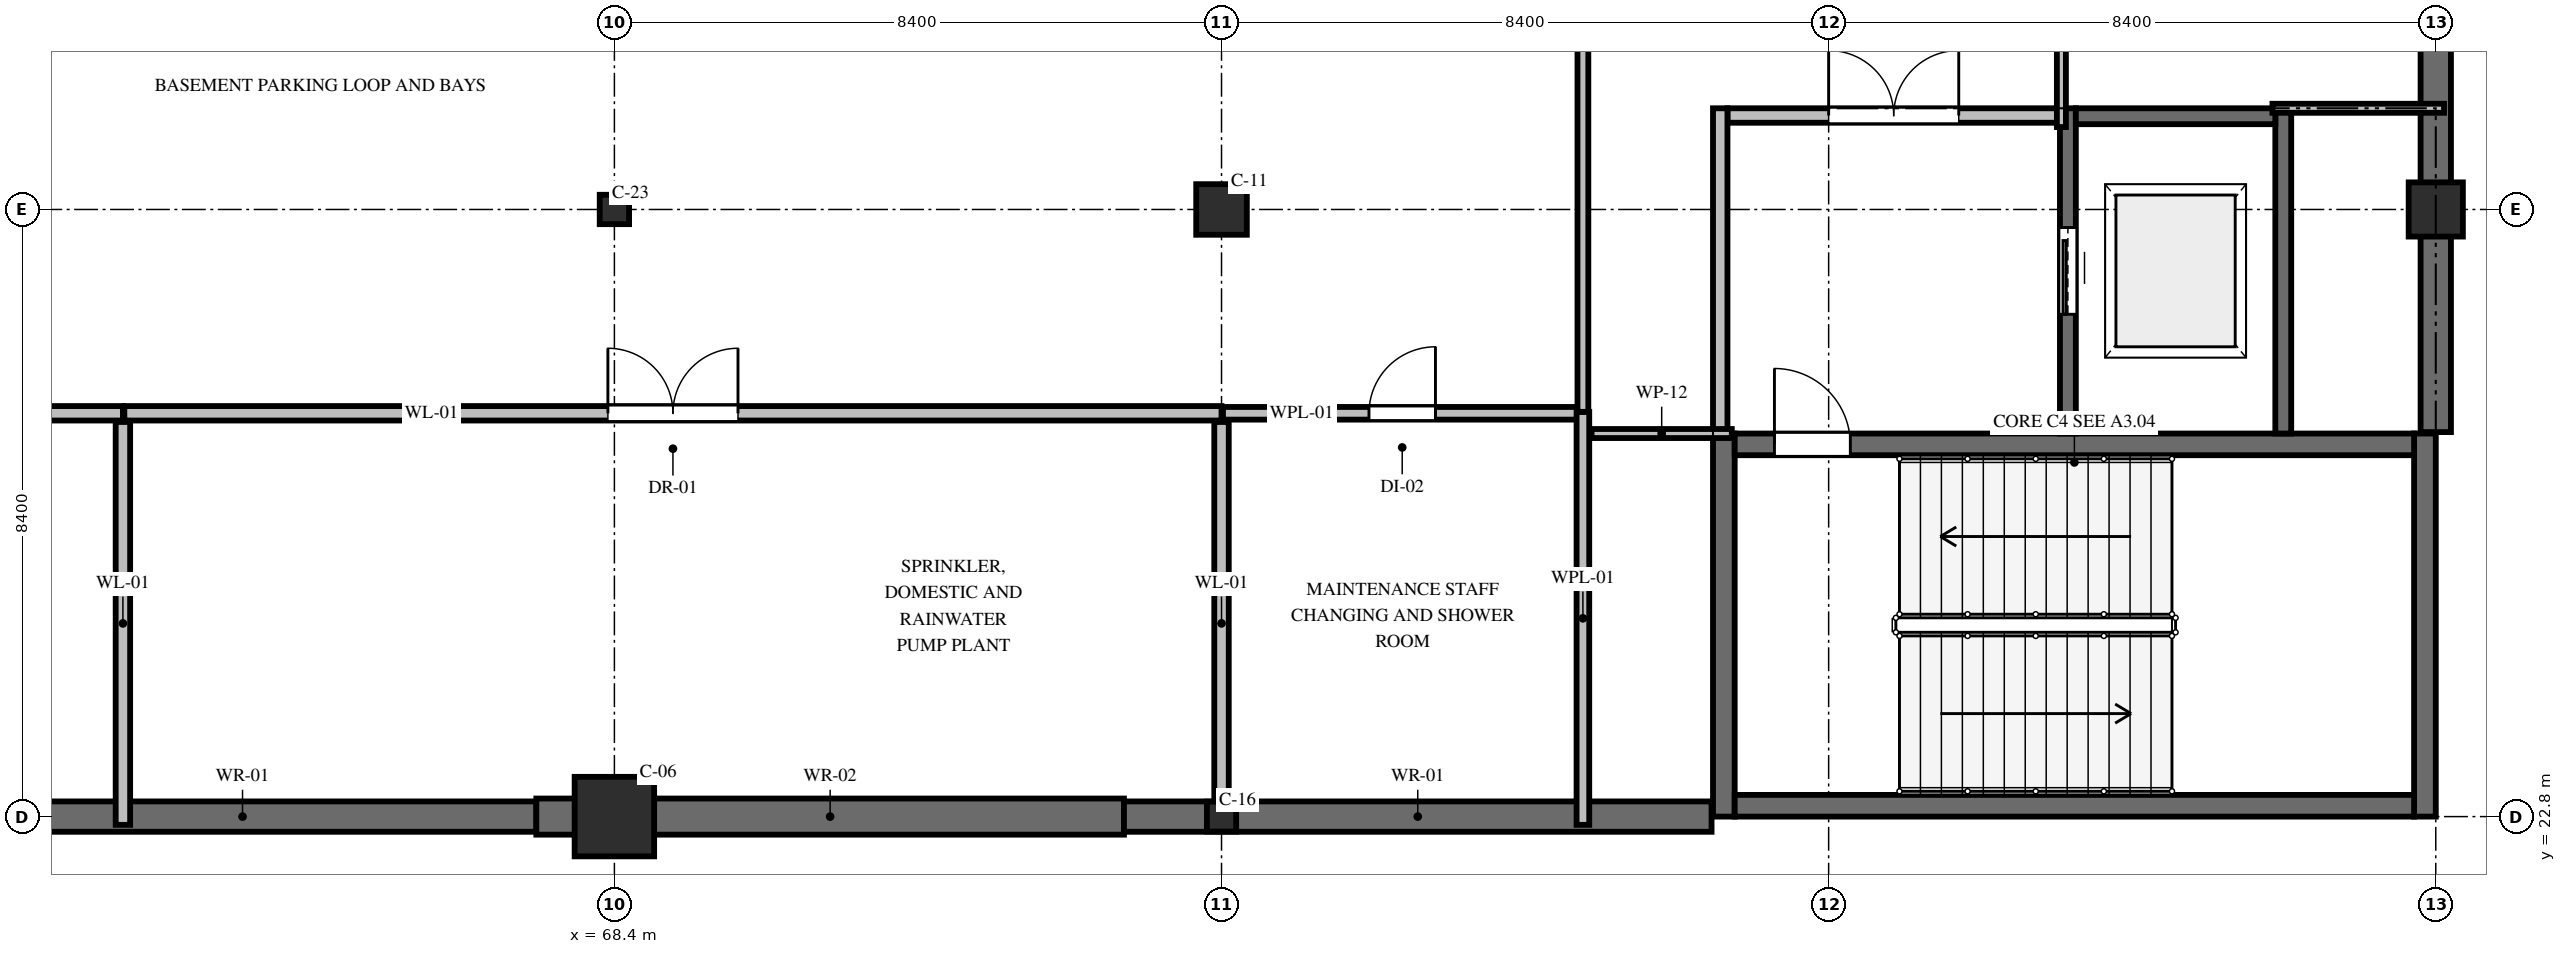
"""IFC4 building model, lengths in metres.
Left out: names, types, materials, properties, quantities, classifications, styles, units other than length and angle.
Written with IfcOpenShell. Run it as: python <this file> out.ifc"""

import sys

from ifc_helpers import new_model, si_unit, direction, frame, frame_2d, origin, origin_2d, place, context, subcontext, project, spatial, rectangle, circle, hollow_circle, i_section, extrude, element, fill, save


model = new_model("IFC4")
c1 = context("Model", 3, precision=1e-05, world=origin(), true_north=direction((0.0, 1.0)))
c2 = subcontext(c1, "Body", "Model", "MODEL_VIEW")
j1 = project(units=[si_unit("LENGTHUNIT", "METRE"), si_unit("PLANEANGLEUNIT", "RADIAN")], contexts=[c1])
p1 = place(None, origin())
s1 = spatial("IfcSite", under=j1, at=p1, CompositionType="ELEMENT")
p2 = place(p1, origin())
s2 = spatial("IfcBuilding", under=s1, at=p2, CompositionType="ELEMENT")
p3 = place(p2, frame((0.0, 0.0, -4.8)))
s3 = spatial("IfcBuildingStorey", under=s2, at=p3, CompositionType="ELEMENT", Elevation=-4.8)
p4 = place(p3, frame((68.4, 22.8, 0.0), z_axis=(0.0, 0.0, 1.0), x_axis=(1.0, 0.0, 0.0)))
e1 = element("IfcColumn", 1, at=p4, inside=s3, PredefinedType="COLUMN", context=c2, shape_type="SweptSolid", body=[
    extrude(rectangle(XDim=1.1, YDim=1.1, at=origin_2d()), origin(), (0.0, 0.0, 1.0), 4.8),
])
p5 = place(p3, frame((68.4, 31.2, 0.0), z_axis=(0.0, 0.0, 1.0), x_axis=(1.0, 0.0, 0.0)))
e2 = element("IfcColumn", 2, at=p5, inside=s3, PredefinedType="COLUMN", context=c2, shape_type="SweptSolid", body=[
    extrude(hollow_circle(Radius=0.203, WallThickness=0.016, at=origin_2d()), origin(), (0.0, 0.0, 1.0), 4.8),
])
p6 = place(p3, frame((76.8, 22.8, 0.0), z_axis=(0.0, 0.0, 1.0), x_axis=(1.0, 0.0, 0.0)))
e3 = element("IfcColumn", 3, at=p6, inside=s3, PredefinedType="COLUMN", context=c2, shape_type="SweptSolid", body=[
    extrude(i_section(OverallWidth=0.405, OverallDepth=0.414, WebThickness=0.018, FlangeThickness=0.028, FilletRadius=0.022, at=origin_2d()), origin(), (0.0, 0.0, 1.0), 4.8),
])
p7 = place(p3, frame((76.8, 31.2, 0.0), z_axis=(0.0, 0.0, 1.0), x_axis=(1.0, 0.0, 0.0)))
e4 = element("IfcColumn", 4, at=p7, inside=s3, PredefinedType="COLUMN", context=c2, shape_type="SweptSolid", body=[
    extrude(circle(Radius=0.35, at=origin_2d()), origin(), (0.0, 0.0, 1.0), 4.8),
])
p8 = place(p3, frame((93.6, 31.2, 0.0), z_axis=(0.0, 0.0, 1.0), x_axis=(1.0, 0.0, 0.0)))
e5 = element("IfcColumn", 5, at=p8, inside=s3, PredefinedType="COLUMN", context=c2, shape_type="SweptSolid", body=[
    extrude(rectangle(XDim=0.75, YDim=0.75, at=origin_2d()), origin(), (0.0, 0.0, 1.0), 4.8),
])
p9 = place(p3, frame((59.19, 22.8, 0.0), z_axis=(0.0, 0.0, 1.0), x_axis=(1.0, 0.0, 0.0)))
e6 = element("IfcWall", 6, at=p9, inside=s3, PredefinedType="USERDEFINED", context=c2, shape_type="SweptSolid", body=[
    extrude(rectangle(XDim=8.13, YDim=0.42, at=frame_2d((4.065, 0.0))), origin(), (0.0, 0.0, 1.0), 4.32),
])
p10 = place(p3, frame((67.32, 22.8, 0.0), z_axis=(0.0, 0.0, 1.0), x_axis=(1.0, 0.0, 0.0)))
e7 = element("IfcWall", 7, at=p10, inside=s3, PredefinedType="USERDEFINED", context=c2, shape_type="SweptSolid", body=[
    extrude(rectangle(XDim=8.13, YDim=0.5, at=frame_2d((4.065, 0.0))), origin(), (0.0, 0.0, 1.0), 4.32),
])
p11 = place(p3, frame((75.45, 22.8, 0.0), z_axis=(0.0, 0.0, 1.0), x_axis=(1.0, 0.0, 0.0)))
e8 = element("IfcWall", 8, at=p11, inside=s3, PredefinedType="USERDEFINED", context=c2, shape_type="SweptSolid", body=[
    extrude(rectangle(XDim=8.13, YDim=0.42, at=frame_2d((4.065, 0.0))), origin(), (0.0, 0.0, 1.0), 4.32),
])
p12 = place(p3, frame((93.6, 28.12, 0.0), z_axis=(0.0, 0.0, 1.0), x_axis=(0.0, 1.0, 0.0)))
e9 = element("IfcWall", 9, at=p12, inside=s3, PredefinedType="USERDEFINED", context=c2, shape_type="SweptSolid", body=[
    extrude(rectangle(XDim=8.309, YDim=0.42, at=frame_2d((4.154, 0.0))), origin(), (0.0, 0.0, 1.0), 4.32),
])
for number, where, z_axis, x_axis in (
    (10, (83.75, 22.8, 0.0), (0.0, 0.0, 1.0), (0.0, 1.0, 0.0)),
    (11, (93.45, 28.1, 0.0), (0.0, 0.0, 1.0), (0.0, -1.0, 0.0)),
):
    element("IfcWall", number, at=place(p3, frame(where, z_axis=z_axis, x_axis=x_axis)), inside=s3, PredefinedType="SHEAR", context=c2, shape_type="SweptSolid", body=[
        extrude(rectangle(XDim=5.3, YDim=0.3, at=frame_2d((2.65, 0.0))), origin(), (0.0, 0.0, 1.0), 4.51),
    ])
p13 = place(p3, frame((93.3, 22.95, 0.0), z_axis=(0.0, 0.0, 1.0), x_axis=(-1.0, 0.0, 0.0)))
e12 = element("IfcWall", 12, at=p13, inside=s3, PredefinedType="SHEAR", context=c2, shape_type="SweptSolid", body=[
    extrude(rectangle(XDim=9.4, YDim=0.3, at=frame_2d((4.7, 0.0))), origin(), (0.0, 0.0, 1.0), 4.51),
])
p14 = place(p3, frame((83.9, 27.95, 0.0), z_axis=(0.0, 0.0, 1.0), x_axis=(1.0, 0.0, 0.0)))
e13 = element("IfcWall", 13, at=p14, inside=s3, PredefinedType="SHEAR", context=c2, shape_type="SweptSolid", body=[
    extrude(rectangle(XDim=9.4, YDim=0.3, at=frame_2d((4.7, 0.0))), origin(), (0.0, 0.0, 1.0), 4.51),
])
p15 = place(p14, frame((0.55, 0.0, 0.0)))
e14 = element("IfcOpeningElement", 14, at=p15, cuts=e13, PredefinedType="OPENING", context=c2, shape_type="SweptSolid", body=[
    extrude(rectangle(XDim=1.05, YDim=2.2, at=frame_2d((0.525, 1.1))), frame((0.0, 0.16, 0.0), z_axis=(0.0, -1.0, 0.0), x_axis=(1.0, 0.0, 0.0)), (0.0, 0.0, 1.0), 0.32),
])
p16 = place(p3, frame((83.8, 32.5, 0.0), z_axis=(0.0, 0.0, 1.0), x_axis=(1.0, 0.0, 0.0)))
e15 = element("IfcWall", 15, at=p16, inside=s3, PredefinedType="SOLIDWALL", context=c2, shape_type="SweptSolid", body=[
    extrude(rectangle(XDim=4.6, YDim=0.2, at=frame_2d((2.3, 0.0))), origin(), (0.0, 0.0, 1.0), 4.45),
])
p17 = place(p16, frame((1.4, 0.0, 0.0)))
e16 = element("IfcOpeningElement", 16, at=p17, cuts=e15, PredefinedType="OPENING", context=c2, shape_type="SweptSolid", body=[
    extrude(rectangle(XDim=1.8, YDim=2.2, at=frame_2d((0.9, 1.1))), frame((0.0, 0.11, 0.0), z_axis=(0.0, -1.0, 0.0), x_axis=(1.0, 0.0, 0.0)), (0.0, 0.0, 1.0), 0.22),
])
p18 = place(p3, frame((83.7, 28.1, 0.0), z_axis=(0.0, 0.0, 1.0), x_axis=(0.0, 1.0, 0.0)))
e17 = element("IfcWall", 17, at=p18, inside=s3, PredefinedType="SOLIDWALL", context=c2, shape_type="SweptSolid", body=[
    extrude(rectangle(XDim=4.5, YDim=0.2, at=frame_2d((2.25, 0.0))), origin(), (0.0, 0.0, 1.0), 4.45),
])
p19 = place(p3, frame((88.51, 28.1, 0.0), z_axis=(0.0, 0.0, 1.0), x_axis=(0.0, 1.0, 0.0)))
e18 = element("IfcWall", 18, at=p19, inside=s3, PredefinedType="SOLIDWALL", context=c2, shape_type="SweptSolid", body=[
    extrude(rectangle(XDim=4.5, YDim=0.22, at=frame_2d((2.25, 0.0))), origin(), (0.0, 0.0, 1.0), 4.51),
])
p20 = place(p19, frame((1.65, 0.0, 0.0)))
e19 = element("IfcOpeningElement", 19, at=p20, cuts=e18, PredefinedType="OPENING", context=c2, shape_type="SweptSolid", body=[
    extrude(rectangle(XDim=1.2, YDim=2.2, at=frame_2d((0.6, 1.1))), frame((0.0, 0.12, 0.0), z_axis=(0.0, -1.0, 0.0), x_axis=(1.0, 0.0, 0.0)), (0.0, 0.0, 1.0), 0.24),
])
p21 = place(p3, frame((91.49, 28.1, 0.0), z_axis=(0.0, 0.0, 1.0), x_axis=(0.0, 1.0, 0.0)))
e20 = element("IfcWall", 20, at=p21, inside=s3, PredefinedType="SOLIDWALL", context=c2, shape_type="SweptSolid", body=[
    extrude(rectangle(XDim=4.5, YDim=0.22, at=frame_2d((2.25, 0.0))), origin(), (0.0, 0.0, 1.0), 4.51),
])
p22 = place(p3, frame((88.62, 32.49, 0.0), z_axis=(0.0, 0.0, 1.0), x_axis=(1.0, 0.0, 0.0)))
e21 = element("IfcWall", 21, at=p22, inside=s3, PredefinedType="SOLIDWALL", context=c2, shape_type="SweptSolid", body=[
    extrude(rectangle(XDim=2.76, YDim=0.22, at=frame_2d((1.38, 0.0))), origin(), (0.0, 0.0, 1.0), 4.51),
])
p23 = place(p3, frame((46.92, 28.38, 0.0), z_axis=(0.0, 0.0, 1.0), x_axis=(1.0, 0.0, 0.0)))
e22 = element("IfcWall", 22, at=p23, inside=s3, PredefinedType="SOLIDWALL", context=c2, shape_type="SweptSolid", body=[
    extrude(rectangle(XDim=14.68, YDim=0.2, at=frame_2d((7.34, 0.0))), origin(), (0.0, 0.0, 1.0), 3.27),
])
p24 = place(p23, frame((6.44, 0.0, 0.0)))
e23 = element("IfcOpeningElement", 23, at=p24, cuts=e22, PredefinedType="OPENING", context=c2, shape_type="SweptSolid", body=[
    extrude(rectangle(XDim=1.8, YDim=2.3, at=frame_2d((0.9, 1.15))), frame((0.0, 0.11, 0.0), z_axis=(0.0, -1.0, 0.0), x_axis=(1.0, 0.0, 0.0)), (0.0, 0.0, 1.0), 0.22),
])
p25 = place(p3, frame((61.6, 28.26, 0.0), z_axis=(0.0, 0.0, 1.0), x_axis=(0.0, -1.0, 0.0)))
e24 = element("IfcWall", 24, at=p25, inside=s3, PredefinedType="SOLIDWALL", context=c2, shape_type="SweptSolid", body=[
    extrude(rectangle(XDim=5.574, YDim=0.2, at=frame_2d((2.787, 0.0))), origin(), (0.0, 0.0, 1.0), 3.87),
])
p26 = place(p3, frame((61.62, 28.38, 0.0), z_axis=(0.0, 0.0, 1.0), x_axis=(1.0, 0.0, 0.0)))
e25 = element("IfcWall", 25, at=p26, inside=s3, PredefinedType="SOLIDWALL", context=c2, shape_type="SweptSolid", body=[
    extrude(rectangle(XDim=15.18, YDim=0.2, at=frame_2d((7.59, 0.0))), origin(), (0.0, 0.0, 1.0), 3.27),
])
p27 = place(p26, frame((6.69, 0.0, 0.0)))
e26 = element("IfcOpeningElement", 26, at=p27, cuts=e25, PredefinedType="OPENING", context=c2, shape_type="SweptSolid", body=[
    extrude(rectangle(XDim=1.8, YDim=2.3, at=frame_2d((0.9, 1.15))), frame((0.0, 0.11, 0.0), z_axis=(0.0, -1.0, 0.0), x_axis=(1.0, 0.0, 0.0)), (0.0, 0.0, 1.0), 0.22),
])
p28 = place(p3, frame((76.8, 28.26, 0.0), z_axis=(0.0, 0.0, 1.0), x_axis=(0.0, -1.0, 0.0)))
e27 = element("IfcWall", 27, at=p28, inside=s3, PredefinedType="SOLIDWALL", context=c2, shape_type="SweptSolid", body=[
    extrude(rectangle(XDim=5.574, YDim=0.2, at=frame_2d((2.787, 0.0))), origin(), (0.0, 0.0, 1.0), 3.62),
])
p29 = place(p3, frame((93.714, 32.6, 0.0), z_axis=(0.0, 0.0, 1.0), x_axis=(-1.0, 0.0, 0.0)))
e28 = element("IfcWall", 28, at=p29, inside=s3, PredefinedType="PARTITIONING", context=c2, shape_type="SweptSolid", body=[
    extrude(rectangle(XDim=2.374, YDim=0.125, at=frame_2d((1.187, 0.0))), origin(), (0.0, 0.0, 1.0), 3.92),
])
p30 = place(p3, frame((88.42, 32.34, 0.0), z_axis=(0.0, 0.0, 1.0), x_axis=(0.0, 1.0, 0.0)))
e29 = element("IfcWall", 29, at=p30, inside=s3, PredefinedType="PARTITIONING", context=c2, shape_type="SweptSolid", body=[
    extrude(rectangle(XDim=24.06, YDim=0.125, at=frame_2d((12.03, 0.0))), origin(), (0.0, 0.0, 1.0), 3.22),
])
p31 = place(p30, frame((10.83, 0.0, 0.0)))
e30 = element("IfcOpeningElement", 30, at=p31, cuts=e29, PredefinedType="OPENING", context=c2, shape_type="SweptSolid", body=[
    extrude(rectangle(XDim=2.4, YDim=2.3, at=frame_2d((1.2, 1.15))), frame((0.0, 0.073, 0.0), z_axis=(0.0, -1.0, 0.0), x_axis=(1.0, 0.0, 0.0)), (0.0, 0.0, 1.0), 0.145),
])
p32 = place(p3, frame((76.82, 28.38, 0.0), z_axis=(0.0, 0.0, 1.0), x_axis=(1.0, 0.0, 0.0)))
e31 = element("IfcWall", 31, at=p32, inside=s3, PredefinedType="PLUMBINGWALL", context=c2, shape_type="SweptSolid", body=[
    extrude(rectangle(XDim=4.96, YDim=0.175, at=frame_2d((2.48, 0.0))), origin(), (0.0, 0.0, 1.0), 3.67),
])
p33 = place(p32, frame((2.02, 0.0, 0.0)))
e32 = element("IfcOpeningElement", 32, at=p33, cuts=e31, PredefinedType="OPENING", context=c2, shape_type="SweptSolid", body=[
    extrude(rectangle(XDim=0.92, YDim=2.15, at=frame_2d((0.46, 1.075))), frame((0.0, 0.097, 0.0), z_axis=(0.0, -1.0, 0.0), x_axis=(1.0, 0.0, 0.0)), (0.0, 0.0, 1.0), 0.195),
])
p34 = place(p3, frame((81.8, 28.4, 0.0), z_axis=(0.0, 0.0, 1.0), x_axis=(0.0, -1.0, 0.0)))
e33 = element("IfcWall", 33, at=p34, inside=s3, PredefinedType="PLUMBINGWALL", context=c2, shape_type="SweptSolid", body=[
    extrude(rectangle(XDim=5.714, YDim=0.175, at=frame_2d((2.857, 0.0))), origin(), (0.0, 0.0, 1.0), 4.45),
])
p35 = place(p3, frame((83.86, 28.1, 0.0), z_axis=(0.0, 0.0, 1.0), x_axis=(-1.0, 0.0, 0.0)))
e34 = element("IfcWall", 34, at=p35, inside=s3, PredefinedType="PARTITIONING", context=c2, shape_type="SweptSolid", body=[
    extrude(rectangle(XDim=1.94, YDim=0.125, at=frame_2d((0.97, 0.0))), origin(), (0.0, 0.0, 1.0), 4.45),
])
p36 = place(p3, frame((81.8, 28.4, 0.0), z_axis=(0.0, 0.0, 1.0), x_axis=(0.0, 1.0, 0.0)))
e35 = element("IfcWall", 35, at=p36, inside=s3, PredefinedType="PARTITIONING", context=c2, shape_type="SweptSolid", body=[
    extrude(rectangle(XDim=48.2, YDim=0.15, at=frame_2d((24.1, 0.0))), origin(), (0.0, 0.0, 1.0), 2.87),
])
p37 = place(p36, frame((23.3, 0.0, 0.0)))
e36 = element("IfcOpeningElement", 36, at=p37, cuts=e35, PredefinedType="OPENING", context=c2, shape_type="SweptSolid", body=[
    extrude(rectangle(XDim=1.6, YDim=2.2, at=frame_2d((0.8, 1.1))), frame((0.0, 0.085, 0.0), z_axis=(0.0, -1.0, 0.0), x_axis=(1.0, 0.0, 0.0)), (0.0, 0.0, 1.0), 0.17),
])
p38 = place(p15, origin())
e37 = element("IfcDoor", 37, at=p38, inside=s3, OperationType="SINGLE_SWING_LEFT", PredefinedType="DOOR", context=c2, shape_type="SweptSolid", body=[
    extrude(rectangle(XDim=1.05, YDim=2.2, at=frame_2d((0.525, 1.1))), frame((0.0, 0.025, 0.0), z_axis=(0.0, -1.0, 0.0), x_axis=(1.0, 0.0, 0.0)), (0.0, 0.0, 1.0), 0.05),
])
fill(e14, e37)
p39 = place(p17, origin())
e38 = element("IfcDoor", 38, at=p39, inside=s3, OperationType="DOUBLE_DOOR_SINGLE_SWING", PredefinedType="DOOR", context=c2, shape_type="SweptSolid", body=[
    extrude(rectangle(XDim=1.8, YDim=2.2, at=frame_2d((0.9, 1.1))), frame((0.0, 0.025, 0.0), z_axis=(0.0, -1.0, 0.0), x_axis=(1.0, 0.0, 0.0)), (0.0, 0.0, 1.0), 0.05),
])
fill(e16, e38)
p40 = place(p20, origin())
e39 = element("IfcDoor", 39, at=p40, inside=s3, OperationType="SLIDING_TO_LEFT", PredefinedType="DOOR", context=c2, shape_type="SweptSolid", body=[
    extrude(rectangle(XDim=1.2, YDim=2.2, at=frame_2d((0.6, 1.1))), frame((0.0, 0.025, 0.0), z_axis=(0.0, -1.0, 0.0), x_axis=(1.0, 0.0, 0.0)), (0.0, 0.0, 1.0), 0.05),
])
fill(e19, e39)
p41 = place(p27, origin())
e40 = element("IfcDoor", 40, at=p41, inside=s3, OperationType="DOUBLE_DOOR_SINGLE_SWING", PredefinedType="DOOR", context=c2, shape_type="SweptSolid", body=[
    extrude(rectangle(XDim=1.8, YDim=2.3, at=frame_2d((0.9, 1.15))), frame((0.0, 0.025, 0.0), z_axis=(0.0, -1.0, 0.0), x_axis=(1.0, 0.0, 0.0)), (0.0, 0.0, 1.0), 0.05),
])
fill(e26, e40)
p42 = place(p33, origin())
e41 = element("IfcDoor", 41, at=p42, inside=s3, OperationType="SINGLE_SWING_RIGHT", PredefinedType="DOOR", context=c2, shape_type="SweptSolid", body=[
    extrude(rectangle(XDim=0.92, YDim=2.15, at=frame_2d((0.46, 1.075))), frame((0.0, 0.025, 0.0), z_axis=(0.0, -1.0, 0.0), x_axis=(1.0, 0.0, 0.0)), (0.0, 0.0, 1.0), 0.05),
])
fill(e32, e41)
save(model, sys.argv[1])
